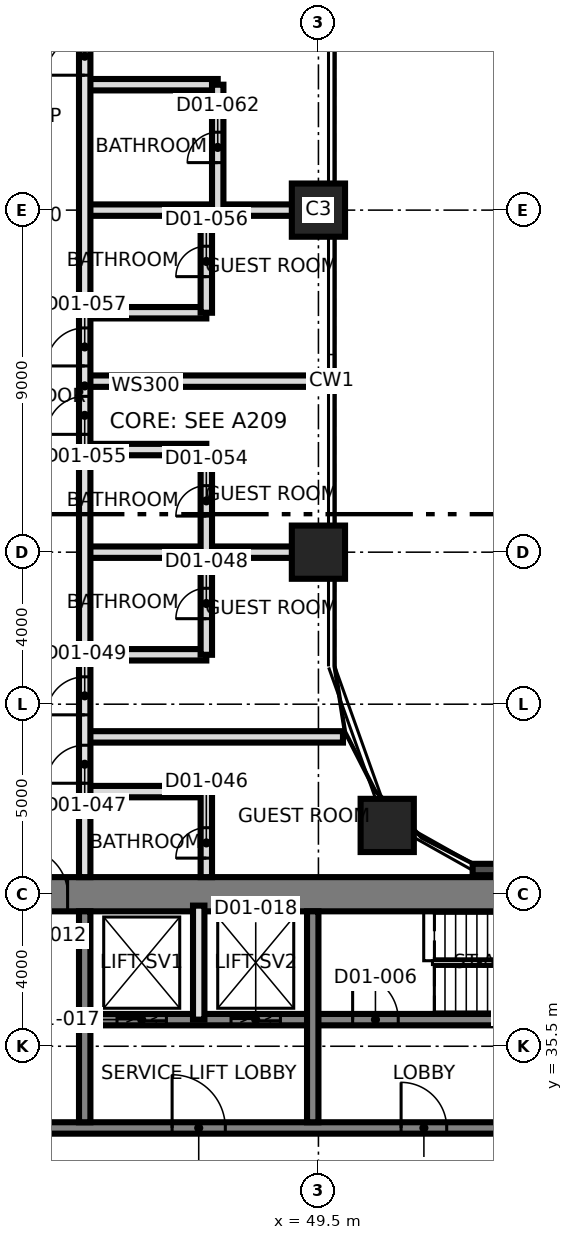
"""IFC4 building model, lengths in metres.
Left out: names, types, materials, properties, quantities, classifications, styles, units other than length and angle.
Written with IfcOpenShell. Run it as: python <this file> out.ifc"""

import sys

from ifc_helpers import new_model, si_unit, direction, frame, frame_2d, origin, origin_2d, place, context, subcontext, project, spatial, rectangle, extrude, element, fill, save


model = new_model("IFC4")
c1 = context("Model", 3, precision=1e-05, world=origin(), true_north=direction((0.0, 1.0)))
c2 = subcontext(c1, "Body", "Model", "MODEL_VIEW")
j1 = project(units=[si_unit("LENGTHUNIT", "METRE"), si_unit("PLANEANGLEUNIT", "RADIAN")], contexts=[c1])
p1 = place(None, origin())
s1 = spatial("IfcSite", under=j1, at=p1, CompositionType="ELEMENT")
p2 = place(p1, origin())
s2 = spatial("IfcBuilding", under=s1, at=p2, CompositionType="ELEMENT")
p3 = place(p2, frame((0.0, 0.0, 33.5)))
s3 = spatial("IfcBuildingStorey", under=s2, at=p3, CompositionType="ELEMENT", Elevation=33.5)
p4 = place(p3, frame((31.05, 39.5, 0.0), z_axis=(0.0, 0.0, 1.0), x_axis=(1.0, 0.0, 0.0)))
e1 = element("IfcWall", 1, at=p4, inside=s3, PredefinedType="SHEAR", context=c2, shape_type="SweptSolid", body=[
    extrude(rectangle(XDim=27.0, YDim=0.9, at=frame_2d((13.5, 0.0))), origin(), (0.0, 0.0, 1.0), 3.7),
])
p5 = place(p4, frame((10.65, 0.0, 0.0)))
e2 = element("IfcOpeningElement", 2, at=p5, cuts=e1, PredefinedType="OPENING", context=c2, shape_type="SweptSolid", body=[
    extrude(rectangle(XDim=1.2, YDim=2.1, at=frame_2d((0.6, 1.05))), frame((0.0, 0.46, 0.0), z_axis=(0.0, -1.0, 0.0), x_axis=(1.0, 0.0, 0.0)), (0.0, 0.0, 1.0), 0.92),
])
p6 = place(p3, frame((31.95, 33.35, 0.0), z_axis=(0.0, 0.0, 1.0), x_axis=(1.0, 0.0, 0.0)))
e3 = element("IfcWall", 3, at=p6, inside=s3, PredefinedType="SHEAR", context=c2, shape_type="SweptSolid", body=[
    extrude(rectangle(XDim=26.1, YDim=0.3, at=frame_2d((13.05, 0.0))), origin(), (0.0, 0.0, 1.0), 3.7),
])
p7 = place(p6, frame((13.7, 0.0, 0.0)))
e4 = element("IfcOpeningElement", 4, at=p7, cuts=e3, PredefinedType="OPENING", context=c2, shape_type="SweptSolid", body=[
    extrude(rectangle(XDim=1.4, YDim=2.1, at=frame_2d((0.7, 1.05))), frame((0.0, 0.16, 0.0), z_axis=(0.0, -1.0, 0.0), x_axis=(1.0, 0.0, 0.0)), (0.0, 0.0, 1.0), 0.32),
])
p8 = place(p6, frame((5.175, 0.0, 0.0)))
e5 = element("IfcOpeningElement", 5, at=p8, cuts=e3, PredefinedType="OPENING", context=c2, shape_type="SweptSolid", body=[
    extrude(rectangle(XDim=1.2, YDim=2.1, at=frame_2d((0.6, 1.05))), frame((0.0, 0.16, 0.0), z_axis=(0.0, -1.0, 0.0), x_axis=(1.0, 0.0, 0.0)), (0.0, 0.0, 1.0), 0.32),
])
p9 = place(p6, frame((19.725, 0.0, 0.0)))
e6 = element("IfcOpeningElement", 6, at=p9, cuts=e3, PredefinedType="OPENING", context=c2, shape_type="SweptSolid", body=[
    extrude(rectangle(XDim=1.2, YDim=2.1, at=frame_2d((0.6, 1.05))), frame((0.0, 0.16, 0.0), z_axis=(0.0, -1.0, 0.0), x_axis=(1.0, 0.0, 0.0)), (0.0, 0.0, 1.0), 0.32),
])
p10 = place(p3, frame((43.5, 36.2, 0.0), z_axis=(0.0, 0.0, 1.0), x_axis=(1.0, 0.0, 0.0)))
e7 = element("IfcWall", 7, at=p10, inside=s3, PredefinedType="SHEAR", context=c2, shape_type="SweptSolid", body=[
    extrude(rectangle(XDim=14.55, YDim=0.3, at=frame_2d((7.275, 0.0))), origin(), (0.0, 0.0, 1.0), 3.7),
])
p11 = place(p10, frame((6.9, 0.0, 0.0)))
e8 = element("IfcOpeningElement", 8, at=p11, cuts=e7, PredefinedType="OPENING", context=c2, shape_type="SweptSolid", body=[
    extrude(rectangle(XDim=1.2, YDim=2.1, at=frame_2d((0.6, 1.05))), frame((0.0, 0.16, 0.0), z_axis=(0.0, -1.0, 0.0), x_axis=(1.0, 0.0, 0.0)), (0.0, 0.0, 1.0), 0.32),
])
p12 = place(p10, frame((0.7, 0.0, 0.0)))
e9 = element("IfcOpeningElement", 9, at=p12, cuts=e7, PredefinedType="OPENING", context=c2, shape_type="SweptSolid", body=[
    extrude(rectangle(XDim=1.3, YDim=2.4, at=frame_2d((0.65, 1.2))), frame((0.0, 0.16, 0.0), z_axis=(0.0, -1.0, 0.0), x_axis=(1.0, 0.0, 0.0)), (0.0, 0.0, 1.0), 0.32),
])
p13 = place(p10, frame((3.7, 0.0, 0.0)))
e10 = element("IfcOpeningElement", 10, at=p13, cuts=e7, PredefinedType="OPENING", context=c2, shape_type="SweptSolid", body=[
    extrude(rectangle(XDim=1.3, YDim=2.4, at=frame_2d((0.65, 1.2))), frame((0.0, 0.16, 0.0), z_axis=(0.0, -1.0, 0.0), x_axis=(1.0, 0.0, 0.0)), (0.0, 0.0, 1.0), 0.32),
])
for number, where, z_axis, x_axis in (
    (11, (43.35, 33.5, 0.0), (0.0, 0.0, 1.0), (0.0, 1.0, 0.0)),
    (12, (49.35, 33.5, 0.0), (0.0, 0.0, 1.0), (0.0, 1.0, 0.0)),
):
    element("IfcWall", number, at=place(p3, frame(where, z_axis=z_axis, x_axis=x_axis)), inside=s3, PredefinedType="SHEAR", context=c2, shape_type="SweptSolid", body=[
        extrude(rectangle(XDim=5.55, YDim=0.3, at=frame_2d((2.775, 0.0))), origin(), (0.0, 0.0, 1.0), 3.7),
    ])
for number, where, z_axis, x_axis in (
    (13, (51.31, 41.31, 0.0), (0.0, 0.0, 1.0), (1.0, 0.0, 0.0)),
    (14, (49.5, 48.5, 0.0), (0.0, 0.0, 1.0), (1.0, 0.0, 0.0)),
    (15, (49.5, 57.5, 0.0), (0.0, 0.0, 1.0), (1.0, 0.0, 0.0)),
):
    element("IfcColumn", number, at=place(p3, frame(where, z_axis=z_axis, x_axis=x_axis)), inside=s3, PredefinedType="COLUMN", context=c2, shape_type="SweptSolid", body=[
        extrude(rectangle(XDim=1.4, YDim=1.4, at=origin_2d()), origin(), (0.0, 0.0, 1.0), 3.7),
    ])
p14 = place(p3, frame((58.674, 40.15, 0.0), z_axis=(0.0, 0.0, 1.0), x_axis=(-1.0, 0.0, 0.0)))
e16 = element("IfcWall", 16, at=p14, inside=s3, PredefinedType="SOLIDWALL", context=c2, shape_type="SweptSolid", body=[
    extrude(rectangle(XDim=5.116, YDim=0.3, at=frame_2d((2.558, 0.0))), origin(), (0.0, 0.0, 1.0), 3.4),
])
p15 = place(p3, frame((46.35, 36.2, 0.0), z_axis=(0.0, 0.0, 1.0), x_axis=(0.0, 1.0, 0.0)))
e17 = element("IfcWall", 17, at=p15, inside=s3, PredefinedType="SOLIDWALL", context=c2, shape_type="SweptSolid", body=[
    extrude(rectangle(XDim=3.0, YDim=0.3, at=frame_2d((1.5, 0.0))), origin(), (0.0, 0.0, 1.0), 3.4),
])
p16 = place(p3, frame((43.35, 42.2, 0.0), z_axis=(0.0, 0.0, 1.0), x_axis=(1.0, 0.0, 0.0)))
e18 = element("IfcWall", 18, at=p16, inside=s3, PredefinedType="PARTITIONING", context=c2, shape_type="SweptSolid", body=[
    extrude(rectangle(XDim=3.2, YDim=0.3, at=frame_2d((1.6, 0.0))), origin(), (0.0, 0.0, 1.0), 3.4),
])
p17 = place(p3, frame((43.35, 43.64, 0.0), z_axis=(0.0, 0.0, 1.0), x_axis=(1.0, 0.0, 0.0)))
e19 = element("IfcWall", 19, at=p17, inside=s3, PredefinedType="PARTITIONING", context=c2, shape_type="SweptSolid", body=[
    extrude(rectangle(XDim=6.796, YDim=0.3, at=frame_2d((3.398, 0.0))), origin(), (0.0, 0.0, 1.0), 3.4),
])
p18 = place(p3, frame((43.35, 45.8, 0.0), z_axis=(0.0, 0.0, 1.0), x_axis=(1.0, 0.0, 0.0)))
e20 = element("IfcWall", 20, at=p18, inside=s3, PredefinedType="PARTITIONING", context=c2, shape_type="SweptSolid", body=[
    extrude(rectangle(XDim=3.2, YDim=0.3, at=frame_2d((1.6, 0.0))), origin(), (0.0, 0.0, 1.0), 3.4),
])
p19 = place(p3, frame((43.35, 48.5, 0.0), z_axis=(0.0, 0.0, 1.0), x_axis=(1.0, 0.0, 0.0)))
e21 = element("IfcWall", 21, at=p19, inside=s3, PredefinedType="PARTITIONING", context=c2, shape_type="SweptSolid", body=[
    extrude(rectangle(XDim=6.225, YDim=0.3, at=frame_2d((3.112, 0.0))), origin(), (0.0, 0.0, 1.0), 3.4),
])
p20 = place(p3, frame((43.35, 51.2, 0.0), z_axis=(0.0, 0.0, 1.0), x_axis=(1.0, 0.0, 0.0)))
e22 = element("IfcWall", 22, at=p20, inside=s3, PredefinedType="PARTITIONING", context=c2, shape_type="SweptSolid", body=[
    extrude(rectangle(XDim=3.2, YDim=0.3, at=frame_2d((1.6, 0.0))), origin(), (0.0, 0.0, 1.0), 3.4),
])
p21 = place(p3, frame((43.35, 53.0, 0.0), z_axis=(0.0, 0.0, 1.0), x_axis=(1.0, 0.0, 0.0)))
e23 = element("IfcWall", 23, at=p21, inside=s3, PredefinedType="PARTITIONING", context=c2, shape_type="SweptSolid", body=[
    extrude(rectangle(XDim=6.405, YDim=0.3, at=frame_2d((3.202, 0.0))), origin(), (0.0, 0.0, 1.0), 3.4),
])
p22 = place(p3, frame((43.35, 54.8, 0.0), z_axis=(0.0, 0.0, 1.0), x_axis=(1.0, 0.0, 0.0)))
e24 = element("IfcWall", 24, at=p22, inside=s3, PredefinedType="PARTITIONING", context=c2, shape_type="SweptSolid", body=[
    extrude(rectangle(XDim=3.2, YDim=0.3, at=frame_2d((1.6, 0.0))), origin(), (0.0, 0.0, 1.0), 3.4),
])
p23 = place(p3, frame((43.35, 57.5, 0.0), z_axis=(0.0, 0.0, 1.0), x_axis=(1.0, 0.0, 0.0)))
e25 = element("IfcWall", 25, at=p23, inside=s3, PredefinedType="PARTITIONING", context=c2, shape_type="SweptSolid", body=[
    extrude(rectangle(XDim=6.225, YDim=0.3, at=frame_2d((3.112, 0.0))), origin(), (0.0, 0.0, 1.0), 3.4),
])
p24 = place(p3, frame((43.35, 60.8, 0.0), z_axis=(0.0, 0.0, 1.0), x_axis=(1.0, 0.0, 0.0)))
e26 = element("IfcWall", 26, at=p24, inside=s3, PredefinedType="PARTITIONING", context=c2, shape_type="SweptSolid", body=[
    extrude(rectangle(XDim=3.5, YDim=0.3, at=frame_2d((1.75, 0.0))), origin(), (0.0, 0.0, 1.0), 3.4),
])
p25 = place(p3, frame((43.35, 39.95, 0.0), z_axis=(0.0, 0.0, 1.0), x_axis=(0.0, 1.0, 0.0)))
e27 = element("IfcWall", 27, at=p25, inside=s3, PredefinedType="SOLIDWALL", context=c2, shape_type="SweptSolid", body=[
    extrude(rectangle(XDim=25.85, YDim=0.3, at=frame_2d((12.925, 0.0))), origin(), (0.0, 0.0, 1.0), 3.4),
])
p26 = place(p25, frame((2.47, 0.0, 0.0)))
e28 = element("IfcOpeningElement", 28, at=p26, cuts=e27, PredefinedType="OPENING", context=c2, shape_type="SweptSolid", body=[
    extrude(rectangle(XDim=1.0, YDim=2.1, at=frame_2d((0.5, 1.05))), frame((0.0, 0.16, 0.0), z_axis=(0.0, -1.0, 0.0), x_axis=(1.0, 0.0, 0.0)), (0.0, 0.0, 1.0), 0.32),
])
p27 = place(p25, frame((4.27, 0.0, 0.0)))
e29 = element("IfcOpeningElement", 29, at=p27, cuts=e27, PredefinedType="OPENING", context=c2, shape_type="SweptSolid", body=[
    extrude(rectangle(XDim=1.0, YDim=2.1, at=frame_2d((0.5, 1.05))), frame((0.0, 0.16, 0.0), z_axis=(0.0, -1.0, 0.0), x_axis=(1.0, 0.0, 0.0)), (0.0, 0.0, 1.0), 0.32),
])
p28 = place(p25, frame((11.65, 0.0, 0.0)))
e30 = element("IfcOpeningElement", 30, at=p28, cuts=e27, PredefinedType="OPENING", context=c2, shape_type="SweptSolid", body=[
    extrude(rectangle(XDim=1.0, YDim=2.1, at=frame_2d((0.5, 1.05))), frame((0.0, 0.16, 0.0), z_axis=(0.0, -1.0, 0.0), x_axis=(1.0, 0.0, 0.0)), (0.0, 0.0, 1.0), 0.32),
])
p29 = place(p25, frame((13.45, 0.0, 0.0)))
e31 = element("IfcOpeningElement", 31, at=p29, cuts=e27, PredefinedType="OPENING", context=c2, shape_type="SweptSolid", body=[
    extrude(rectangle(XDim=1.0, YDim=2.1, at=frame_2d((0.5, 1.05))), frame((0.0, 0.16, 0.0), z_axis=(0.0, -1.0, 0.0), x_axis=(1.0, 0.0, 0.0)), (0.0, 0.0, 1.0), 0.32),
])
p30 = place(p25, frame((21.1, 0.0, 0.0)))
e32 = element("IfcOpeningElement", 32, at=p30, cuts=e27, PredefinedType="OPENING", context=c2, shape_type="SweptSolid", body=[
    extrude(rectangle(XDim=1.0, YDim=2.4, at=frame_2d((0.5, 1.2))), frame((0.0, 0.16, 0.0), z_axis=(0.0, -1.0, 0.0), x_axis=(1.0, 0.0, 0.0)), (0.0, 0.0, 1.0), 0.32),
])
p31 = place(p3, frame((46.55, 39.95, 0.0), z_axis=(0.0, 0.0, 1.0), x_axis=(0.0, 1.0, 0.0)))
e33 = element("IfcWall", 33, at=p31, inside=s3, PredefinedType="PARTITIONING", context=c2, shape_type="SweptSolid", body=[
    extrude(rectangle(XDim=2.25, YDim=0.3, at=frame_2d((1.125, 0.0))), origin(), (0.0, 0.0, 1.0), 3.4),
])
p32 = place(p31, frame((0.5, 0.0, 0.0)))
e34 = element("IfcOpeningElement", 34, at=p32, cuts=e33, PredefinedType="OPENING", context=c2, shape_type="SweptSolid", body=[
    extrude(rectangle(XDim=0.8, YDim=2.1, at=frame_2d((0.4, 1.05))), frame((0.0, 0.16, 0.0), z_axis=(0.0, -1.0, 0.0), x_axis=(1.0, 0.0, 0.0)), (0.0, 0.0, 1.0), 0.32),
])
p33 = place(p3, frame((46.55, 45.8, 0.0), z_axis=(0.0, 0.0, 1.0), x_axis=(0.0, 1.0, 0.0)))
e35 = element("IfcWall", 35, at=p33, inside=s3, PredefinedType="PARTITIONING", context=c2, shape_type="SweptSolid", body=[
    extrude(rectangle(XDim=5.4, YDim=0.3, at=frame_2d((2.7, 0.0))), origin(), (0.0, 0.0, 1.0), 3.4),
])
p34 = place(p33, frame((0.95, 0.0, 0.0)))
e36 = element("IfcOpeningElement", 36, at=p34, cuts=e35, PredefinedType="OPENING", context=c2, shape_type="SweptSolid", body=[
    extrude(rectangle(XDim=0.8, YDim=2.1, at=frame_2d((0.4, 1.05))), frame((0.0, 0.16, 0.0), z_axis=(0.0, -1.0, 0.0), x_axis=(1.0, 0.0, 0.0)), (0.0, 0.0, 1.0), 0.32),
])
p35 = place(p33, frame((3.65, 0.0, 0.0)))
e37 = element("IfcOpeningElement", 37, at=p35, cuts=e35, PredefinedType="OPENING", context=c2, shape_type="SweptSolid", body=[
    extrude(rectangle(XDim=0.8, YDim=2.1, at=frame_2d((0.4, 1.05))), frame((0.0, 0.16, 0.0), z_axis=(0.0, -1.0, 0.0), x_axis=(1.0, 0.0, 0.0)), (0.0, 0.0, 1.0), 0.32),
])
p36 = place(p3, frame((46.55, 54.8, 0.0), z_axis=(0.0, 0.0, 1.0), x_axis=(0.0, 1.0, 0.0)))
e38 = element("IfcWall", 38, at=p36, inside=s3, PredefinedType="PARTITIONING", context=c2, shape_type="SweptSolid", body=[
    extrude(rectangle(XDim=2.7, YDim=0.3, at=frame_2d((1.35, 0.0))), origin(), (0.0, 0.0, 1.0), 3.4),
])
p37 = place(p36, frame((0.95, 0.0, 0.0)))
e39 = element("IfcOpeningElement", 39, at=p37, cuts=e38, PredefinedType="OPENING", context=c2, shape_type="SweptSolid", body=[
    extrude(rectangle(XDim=0.8, YDim=2.1, at=frame_2d((0.4, 1.05))), frame((0.0, 0.16, 0.0), z_axis=(0.0, -1.0, 0.0), x_axis=(1.0, 0.0, 0.0)), (0.0, 0.0, 1.0), 0.32),
])
p38 = place(p3, frame((46.85, 57.5, 0.0), z_axis=(0.0, 0.0, 1.0), x_axis=(0.0, 1.0, 0.0)))
e40 = element("IfcWall", 40, at=p38, inside=s3, PredefinedType="PARTITIONING", context=c2, shape_type="SweptSolid", body=[
    extrude(rectangle(XDim=3.3, YDim=0.3, at=frame_2d((1.65, 0.0))), origin(), (0.0, 0.0, 1.0), 3.4),
])
p39 = place(p38, frame((1.25, 0.0, 0.0)))
e41 = element("IfcOpeningElement", 41, at=p39, cuts=e40, PredefinedType="OPENING", context=c2, shape_type="SweptSolid", body=[
    extrude(rectangle(XDim=0.8, YDim=2.1, at=frame_2d((0.4, 1.05))), frame((0.0, 0.16, 0.0), z_axis=(0.0, -1.0, 0.0), x_axis=(1.0, 0.0, 0.0)), (0.0, 0.0, 1.0), 0.32),
])
p40 = place(p7, origin())
e42 = element("IfcDoor", 42, at=p40, inside=s3, OperationType="SINGLE_SWING_RIGHT", PredefinedType="DOOR", context=c2, shape_type="SweptSolid", body=[
    extrude(rectangle(XDim=1.4, YDim=2.1, at=frame_2d((0.7, 1.05))), frame((0.0, 0.025, 0.0), z_axis=(0.0, -1.0, 0.0), x_axis=(1.0, 0.0, 0.0)), (0.0, 0.0, 1.0), 0.05),
])
fill(e4, e42)
p41 = place(p9, origin())
e43 = element("IfcDoor", 43, at=p41, inside=s3, OperationType="SINGLE_SWING_RIGHT", PredefinedType="DOOR", context=c2, shape_type="SweptSolid", body=[
    extrude(rectangle(XDim=1.2, YDim=2.1, at=frame_2d((0.6, 1.05))), frame((0.0, 0.025, 0.0), z_axis=(0.0, -1.0, 0.0), x_axis=(1.0, 0.0, 0.0)), (0.0, 0.0, 1.0), 0.05),
])
fill(e6, e43)
p42 = place(p11, origin())
e44 = element("IfcDoor", 44, at=p42, inside=s3, OperationType="SINGLE_SWING_LEFT", PredefinedType="DOOR", context=c2, shape_type="SweptSolid", body=[
    extrude(rectangle(XDim=1.2, YDim=2.1, at=frame_2d((0.6, 1.05))), frame((0.0, 0.025, 0.0), z_axis=(0.0, -1.0, 0.0), x_axis=(1.0, 0.0, 0.0)), (0.0, 0.0, 1.0), 0.05),
])
fill(e8, e44)
p43 = place(p5, origin())
e45 = element("IfcDoor", 45, at=p43, inside=s3, OperationType="SINGLE_SWING_RIGHT", PredefinedType="DOOR", context=c2, shape_type="SweptSolid", body=[
    extrude(rectangle(XDim=1.2, YDim=2.1, at=frame_2d((0.6, 1.05))), frame((0.0, 0.025, 0.0), z_axis=(0.0, -1.0, 0.0), x_axis=(1.0, 0.0, 0.0)), (0.0, 0.0, 1.0), 0.05),
])
fill(e2, e45)
p44 = place(p12, origin())
e46 = element("IfcDoor", 46, at=p44, inside=s3, OperationType="SLIDING_TO_LEFT", PredefinedType="DOOR", context=c2, shape_type="SweptSolid", body=[
    extrude(rectangle(XDim=1.3, YDim=2.4, at=frame_2d((0.65, 1.2))), frame((0.0, 0.025, 0.0), z_axis=(0.0, -1.0, 0.0), x_axis=(1.0, 0.0, 0.0)), (0.0, 0.0, 1.0), 0.05),
])
fill(e9, e46)
p45 = place(p13, origin())
e47 = element("IfcDoor", 47, at=p45, inside=s3, OperationType="SLIDING_TO_LEFT", PredefinedType="DOOR", context=c2, shape_type="SweptSolid", body=[
    extrude(rectangle(XDim=1.3, YDim=2.4, at=frame_2d((0.65, 1.2))), frame((0.0, 0.025, 0.0), z_axis=(0.0, -1.0, 0.0), x_axis=(1.0, 0.0, 0.0)), (0.0, 0.0, 1.0), 0.05),
])
fill(e10, e47)
p46 = place(p32, origin())
e48 = element("IfcDoor", 48, at=p46, inside=s3, OperationType="SINGLE_SWING_RIGHT", PredefinedType="DOOR", context=c2, shape_type="SweptSolid", body=[
    extrude(rectangle(XDim=0.8, YDim=2.1, at=frame_2d((0.4, 1.05))), frame((0.0, 0.025, 0.0), z_axis=(0.0, -1.0, 0.0), x_axis=(1.0, 0.0, 0.0)), (0.0, 0.0, 1.0), 0.05),
])
fill(e34, e48)
p47 = place(p26, origin())
e49 = element("IfcDoor", 49, at=p47, inside=s3, OperationType="SINGLE_SWING_LEFT", PredefinedType="DOOR", context=c2, shape_type="SweptSolid", body=[
    extrude(rectangle(XDim=1.0, YDim=2.1, at=frame_2d((0.5, 1.05))), frame((0.0, 0.025, 0.0), z_axis=(0.0, -1.0, 0.0), x_axis=(1.0, 0.0, 0.0)), (0.0, 0.0, 1.0), 0.05),
])
fill(e28, e49)
p48 = place(p34, origin())
e50 = element("IfcDoor", 50, at=p48, inside=s3, OperationType="SINGLE_SWING_LEFT", PredefinedType="DOOR", context=c2, shape_type="SweptSolid", body=[
    extrude(rectangle(XDim=0.8, YDim=2.1, at=frame_2d((0.4, 1.05))), frame((0.0, 0.025, 0.0), z_axis=(0.0, -1.0, 0.0), x_axis=(1.0, 0.0, 0.0)), (0.0, 0.0, 1.0), 0.05),
])
fill(e36, e50)
p49 = place(p27, origin())
e51 = element("IfcDoor", 51, at=p49, inside=s3, OperationType="SINGLE_SWING_LEFT", PredefinedType="DOOR", context=c2, shape_type="SweptSolid", body=[
    extrude(rectangle(XDim=1.0, YDim=2.1, at=frame_2d((0.5, 1.05))), frame((0.0, 0.025, 0.0), z_axis=(0.0, -1.0, 0.0), x_axis=(1.0, 0.0, 0.0)), (0.0, 0.0, 1.0), 0.05),
])
fill(e29, e51)
p50 = place(p35, origin())
e52 = element("IfcDoor", 52, at=p50, inside=s3, OperationType="SINGLE_SWING_LEFT", PredefinedType="DOOR", context=c2, shape_type="SweptSolid", body=[
    extrude(rectangle(XDim=0.8, YDim=2.1, at=frame_2d((0.4, 1.05))), frame((0.0, 0.025, 0.0), z_axis=(0.0, -1.0, 0.0), x_axis=(1.0, 0.0, 0.0)), (0.0, 0.0, 1.0), 0.05),
])
fill(e37, e52)
p51 = place(p28, origin())
e53 = element("IfcDoor", 53, at=p51, inside=s3, OperationType="SINGLE_SWING_LEFT", PredefinedType="DOOR", context=c2, shape_type="SweptSolid", body=[
    extrude(rectangle(XDim=1.0, YDim=2.1, at=frame_2d((0.5, 1.05))), frame((0.0, 0.025, 0.0), z_axis=(0.0, -1.0, 0.0), x_axis=(1.0, 0.0, 0.0)), (0.0, 0.0, 1.0), 0.05),
])
fill(e30, e53)
p52 = place(p37, origin())
e54 = element("IfcDoor", 54, at=p52, inside=s3, OperationType="SINGLE_SWING_LEFT", PredefinedType="DOOR", context=c2, shape_type="SweptSolid", body=[
    extrude(rectangle(XDim=0.8, YDim=2.1, at=frame_2d((0.4, 1.05))), frame((0.0, 0.025, 0.0), z_axis=(0.0, -1.0, 0.0), x_axis=(1.0, 0.0, 0.0)), (0.0, 0.0, 1.0), 0.05),
])
fill(e39, e54)
p53 = place(p29, origin())
e55 = element("IfcDoor", 55, at=p53, inside=s3, OperationType="SINGLE_SWING_RIGHT", PredefinedType="DOOR", context=c2, shape_type="SweptSolid", body=[
    extrude(rectangle(XDim=1.0, YDim=2.1, at=frame_2d((0.5, 1.05))), frame((0.0, 0.025, 0.0), z_axis=(0.0, -1.0, 0.0), x_axis=(1.0, 0.0, 0.0)), (0.0, 0.0, 1.0), 0.05),
])
fill(e31, e55)
p54 = place(p39, origin())
e56 = element("IfcDoor", 56, at=p54, inside=s3, OperationType="SINGLE_SWING_LEFT", PredefinedType="DOOR", context=c2, shape_type="SweptSolid", body=[
    extrude(rectangle(XDim=0.8, YDim=2.1, at=frame_2d((0.4, 1.05))), frame((0.0, 0.025, 0.0), z_axis=(0.0, -1.0, 0.0), x_axis=(1.0, 0.0, 0.0)), (0.0, 0.0, 1.0), 0.05),
])
fill(e41, e56)
p55 = place(p30, origin())
e57 = element("IfcDoor", 57, at=p55, inside=s3, OperationType="SINGLE_SWING_RIGHT", PredefinedType="DOOR", context=c2, shape_type="SweptSolid", body=[
    extrude(rectangle(XDim=1.0, YDim=2.4, at=frame_2d((0.5, 1.2))), frame((0.0, 0.025, 0.0), z_axis=(0.0, -1.0, 0.0), x_axis=(1.0, 0.0, 0.0)), (0.0, 0.0, 1.0), 0.05),
])
fill(e32, e57)
save(model, sys.argv[1])
